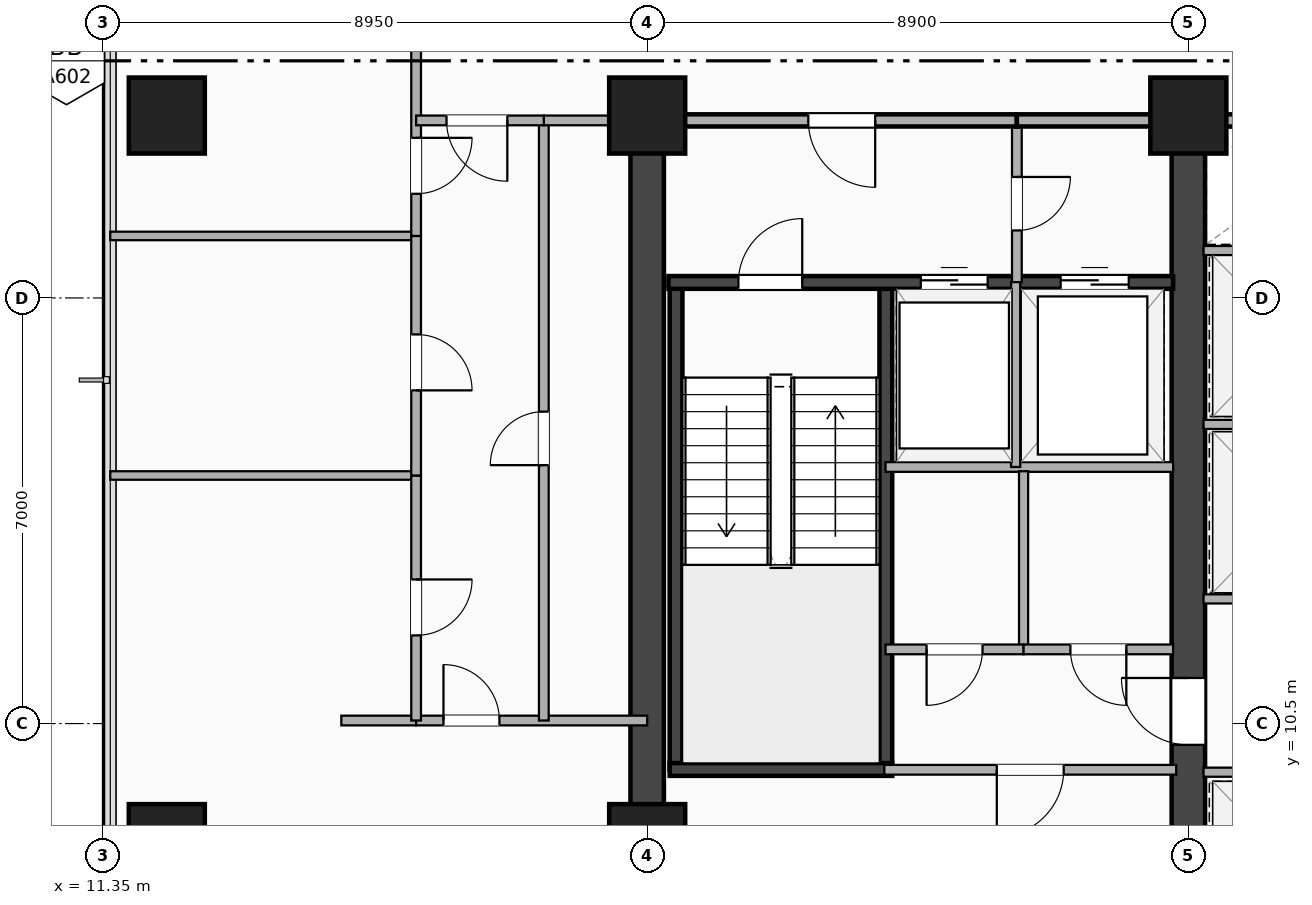
"""IFC4 building model, lengths in metres.
Left out: names, types, materials, properties, quantities, classifications, styles, units other than length and angle.
Written with IfcOpenShell. Run it as: python <this file> out.ifc"""

import sys

from ifc_helpers import new_model, si_unit, direction, frame, frame_2d, origin, origin_2d, place, context, subcontext, project, spatial, rectangle, extrude, element, fill, save


model = new_model("IFC4")
c1 = context("Model", 3, precision=1e-05, world=origin(), true_north=direction((0.0, 1.0)))
c2 = subcontext(c1, "Body", "Model", "MODEL_VIEW")
j1 = project(units=[si_unit("LENGTHUNIT", "METRE"), si_unit("PLANEANGLEUNIT", "RADIAN")], contexts=[c1])
p1 = place(None, origin())
s1 = spatial("IfcSite", under=j1, at=p1, CompositionType="ELEMENT")
p2 = place(p1, origin())
s2 = spatial("IfcBuilding", under=s1, at=p2, CompositionType="ELEMENT")
p3 = place(p2, frame((0.0, 0.0, 83.8)))
s3 = spatial("IfcBuildingStorey", under=s2, at=p3, CompositionType="ELEMENT", Elevation=83.8)
p4 = place(p3, frame((20.3, 3.5, 0.0), z_axis=(0.0, 0.0, 1.0), x_axis=(0.0, 1.0, 0.0)))
e1 = element("IfcWall", 1, at=p4, inside=s3, PredefinedType="SHEAR", context=c2, shape_type="SweptSolid", body=[
    extrude(rectangle(XDim=16.9, YDim=0.55, at=frame_2d((8.45, 0.0))), origin(), (0.0, 0.0, 1.0), 4.14),
])
p5 = place(p3, frame((29.2, 3.5, 0.0), z_axis=(0.0, 0.0, 1.0), x_axis=(0.0, 1.0, 0.0)))
e2 = element("IfcWall", 2, at=p5, inside=s3, PredefinedType="SHEAR", context=c2, shape_type="SweptSolid", body=[
    extrude(rectangle(XDim=16.9, YDim=0.55, at=frame_2d((8.45, 0.0))), origin(), (0.0, 0.0, 1.0), 4.14),
])
p6 = place(p5, frame((7.75, 0.0, 0.0), z_axis=(0.0, 0.0, 1.0), x_axis=(-1.0, 0.0, 0.0)))
e3 = element("IfcOpeningElement", 3, at=p6, cuts=e2, PredefinedType="OPENING", context=c2, shape_type="SweptSolid", body=[
    extrude(rectangle(XDim=1.1, YDim=2.15, at=frame_2d((0.55, 1.075))), frame((0.0, 0.285, 0.0), z_axis=(0.0, -1.0, 0.0), x_axis=(1.0, 0.0, 0.0)), (0.0, 0.0, 1.0), 0.57),
])
for number, where, z_axis, x_axis in (
    (4, (20.775, 9.745, 0.0), (0.0, 0.0, 1.0), (0.0, 1.0, 0.0)),
    (5, (24.225, 9.745, 0.0), (0.0, 0.0, 1.0), (0.0, 1.0, 0.0)),
):
    element("IfcWall", number, at=place(p3, frame(where, z_axis=z_axis, x_axis=x_axis)), inside=s3, PredefinedType="SHEAR", context=c2, shape_type="SweptSolid", body=[
        extrude(rectangle(XDim=8.01, YDim=0.21, at=frame_2d((4.005, 0.0))), origin(), (0.0, 0.0, 1.0), 4.14),
    ])
p7 = place(p3, frame((20.67, 9.745, 0.0), z_axis=(0.0, 0.0, 1.0), x_axis=(1.0, 0.0, 0.0)))
e6 = element("IfcWall", 6, at=p7, inside=s3, PredefinedType="SHEAR", context=c2, shape_type="SweptSolid", body=[
    extrude(rectangle(XDim=3.66, YDim=0.21, at=frame_2d((1.83, 0.0))), origin(), (0.0, 0.0, 1.0), 4.14),
])
p8 = place(p3, frame((20.65, 17.755, 0.0), z_axis=(0.0, 0.0, 1.0), x_axis=(1.0, 0.0, 0.0)))
e7 = element("IfcWall", 7, at=p8, inside=s3, PredefinedType="SHEAR", context=c2, shape_type="SweptSolid", body=[
    extrude(rectangle(XDim=8.3, YDim=0.21, at=frame_2d((4.15, 0.0))), origin(), (0.0, 0.0, 1.0), 4.14),
])
p9 = place(p8, frame((2.2, 0.0, 0.0), z_axis=(0.0, 0.0, 1.0), x_axis=(-1.0, 0.0, 0.0)))
e8 = element("IfcOpeningElement", 8, at=p9, cuts=e7, PredefinedType="OPENING", context=c2, shape_type="SweptSolid", body=[
    extrude(rectangle(XDim=1.05, YDim=2.15, at=frame_2d((0.525, 1.075))), frame((0.0, 0.115, 0.0), z_axis=(0.0, -1.0, 0.0), x_axis=(1.0, 0.0, 0.0)), (0.0, 0.0, 1.0), 0.23),
])
p10 = place(p8, frame((4.15, 0.0, 0.0)))
e9 = element("IfcOpeningElement", 9, at=p10, cuts=e7, PredefinedType="OPENING", context=c2, shape_type="SweptSolid", body=[
    extrude(rectangle(XDim=1.1, YDim=2.18, at=frame_2d((0.55, 1.09))), frame((0.0, 0.115, 0.0), z_axis=(0.0, -1.0, 0.0), x_axis=(1.0, 0.0, 0.0)), (0.0, 0.0, 1.0), 0.23),
])
p11 = place(p8, frame((6.45, 0.0, 0.0)))
e10 = element("IfcOpeningElement", 10, at=p11, cuts=e7, PredefinedType="OPENING", context=c2, shape_type="SweptSolid", body=[
    extrude(rectangle(XDim=1.12, YDim=2.2, at=frame_2d((0.56, 1.1))), frame((0.0, 0.115, 0.0), z_axis=(0.0, -1.0, 0.0), x_axis=(1.0, 0.0, 0.0)), (0.0, 0.0, 1.0), 0.23),
])
for number, where, z_axis, x_axis in (
    (11, (20.3, 8.55, -0.26), (0.0, 0.0, 1.0), (1.0, 0.0, 0.0)),
    (12, (20.3, 20.5, -0.26), (0.0, 0.0, 1.0), (1.0, 0.0, 0.0)),
    (13, (29.2, 20.5, -0.26), (0.0, 0.0, 1.0), (1.0, 0.0, 0.0)),
    (14, (12.4, 8.55, -0.26), (0.0, 0.0, 1.0), (1.0, 0.0, 0.0)),
    (15, (12.4, 20.5, -0.26), (0.0, 0.0, 1.0), (1.0, 0.0, 0.0)),
):
    element("IfcColumn", number, at=place(p3, frame(where, z_axis=z_axis, x_axis=x_axis)), inside=s3, PredefinedType="COLUMN", context=c2, shape_type="SweptSolid", body=[
        extrude(rectangle(XDim=1.25, YDim=1.25, at=origin_2d()), origin(), (0.0, 0.0, 1.0), 4.4),
    ])
p12 = place(p3, frame((26.38, 17.76, 0.0), z_axis=(0.0, 0.0, 1.0), x_axis=(0.0, 1.0, 0.0)))
e16 = element("IfcWall", 16, at=p12, inside=s3, PredefinedType="PARTITIONING", context=c2, shape_type="SweptSolid", body=[
    extrude(rectangle(XDim=2.66, YDim=0.16, at=frame_2d((1.33, 0.0))), origin(), (0.0, 0.0, 1.0), 3.514),
])
p13 = place(p12, frame((0.85, 0.0, 0.0)))
e17 = element("IfcOpeningElement", 17, at=p13, cuts=e16, PredefinedType="OPENING", context=c2, shape_type="SweptSolid", body=[
    extrude(rectangle(XDim=0.88, YDim=2.08, at=frame_2d((0.44, 1.04))), frame((0.0, 0.09, 0.0), z_axis=(0.0, -1.0, 0.0), x_axis=(1.0, 0.0, 0.0)), (0.0, 0.0, 1.0), 0.18),
])
p14 = place(p3, frame((24.22, 14.72, 0.0), z_axis=(0.0, 0.0, 1.0), x_axis=(1.0, 0.0, 0.0)))
e18 = element("IfcWall", 18, at=p14, inside=s3, PredefinedType="PARTITIONING", context=c2, shape_type="SweptSolid", body=[
    extrude(rectangle(XDim=4.73, YDim=0.16, at=frame_2d((2.365, 0.0))), origin(), (0.0, 0.0, 1.0), 4.14),
])
p15 = place(p3, frame((26.36, 14.72, 0.0), z_axis=(0.0, 0.0, 1.0), x_axis=(0.0, 1.0, 0.0)))
e19 = element("IfcWall", 19, at=p15, inside=s3, PredefinedType="PARTITIONING", context=c2, shape_type="SweptSolid", body=[
    extrude(rectangle(XDim=3.04, YDim=0.15, at=frame_2d((1.52, 0.0))), origin(), (0.0, 0.0, 1.0), 4.14),
])
p16 = place(p3, frame((20.65, 20.42, 0.0), z_axis=(0.0, 0.0, 1.0), x_axis=(1.0, 0.0, 0.0)))
e20 = element("IfcWall", 20, at=p16, inside=s3, PredefinedType="PARTITIONING", context=c2, shape_type="SweptSolid", body=[
    extrude(rectangle(XDim=5.73, YDim=0.2, at=frame_2d((2.865, 0.0))), origin(), (0.0, 0.0, 1.0), 3.213),
])
p17 = place(p16, frame((2.3, 0.0, 0.0)))
e21 = element("IfcOpeningElement", 21, at=p17, cuts=e20, PredefinedType="OPENING", context=c2, shape_type="SweptSolid", body=[
    extrude(rectangle(XDim=1.1, YDim=2.15, at=frame_2d((0.55, 1.075))), frame((0.0, 0.11, 0.0), z_axis=(0.0, -1.0, 0.0), x_axis=(1.0, 0.0, 0.0)), (0.0, 0.0, 1.0), 0.22),
])
p18 = place(p3, frame((26.38, 20.42, 0.0), z_axis=(0.0, 0.0, 1.0), x_axis=(1.0, 0.0, 0.0)))
e22 = element("IfcWall", 22, at=p18, inside=s3, PredefinedType="PARTITIONING", context=c2, shape_type="SweptSolid", body=[
    extrude(rectangle(XDim=2.82, YDim=0.2, at=frame_2d((1.41, 0.0))), origin(), (0.0, 0.0, 1.0), 3.213),
])
p19 = place(p3, frame((29.2, 20.42, 0.0), z_axis=(0.0, 0.0, 1.0), x_axis=(1.0, 0.0, 0.0)))
e23 = element("IfcWall", 23, at=p19, inside=s3, PredefinedType="PARTITIONING", context=c2, shape_type="SweptSolid", body=[
    extrude(rectangle(XDim=7.8, YDim=0.2, at=frame_2d((3.9, 0.0))), origin(), (0.0, 0.0, 1.0), 3.213),
])
p20 = place(p19, frame((3.55, 0.0, 0.0)))
e24 = element("IfcOpeningElement", 24, at=p20, cuts=e23, PredefinedType="OPENING", context=c2, shape_type="SweptSolid", body=[
    extrude(rectangle(XDim=1.1, YDim=2.15, at=frame_2d((0.55, 1.075))), frame((0.0, 0.11, 0.0), z_axis=(0.0, -1.0, 0.0), x_axis=(1.0, 0.0, 0.0)), (0.0, 0.0, 1.0), 0.22),
])
p21 = place(p3, frame((26.49, 11.72, 0.0), z_axis=(0.0, 0.0, 1.0), x_axis=(0.0, 1.0, 0.0)))
e25 = element("IfcWall", 25, at=p21, inside=s3, PredefinedType="PARTITIONING", context=c2, shape_type="SweptSolid", body=[
    extrude(rectangle(XDim=2.93, YDim=0.15, at=frame_2d((1.465, 0.0))), origin(), (0.0, 0.0, 1.0), 4.14),
])
p22 = place(p3, frame((24.22, 11.72, 0.0), z_axis=(0.0, 0.0, 1.0), x_axis=(1.0, 0.0, 0.0)))
e26 = element("IfcWall", 26, at=p22, inside=s3, PredefinedType="PARTITIONING", context=c2, shape_type="SweptSolid", body=[
    extrude(rectangle(XDim=2.271, YDim=0.16, at=frame_2d((1.135, 0.0))), origin(), (0.0, 0.0, 1.0), 4.14),
])
p23 = place(p22, frame((0.675, 0.0, 0.0)))
e27 = element("IfcOpeningElement", 27, at=p23, cuts=e26, PredefinedType="OPENING", context=c2, shape_type="SweptSolid", body=[
    extrude(rectangle(XDim=0.92, YDim=2.08, at=frame_2d((0.46, 1.04))), frame((0.0, 0.09, 0.0), z_axis=(0.0, -1.0, 0.0), x_axis=(1.0, 0.0, 0.0)), (0.0, 0.0, 1.0), 0.18),
])
p24 = place(p3, frame((26.49, 11.72, 0.0), z_axis=(0.0, 0.0, 1.0), x_axis=(1.0, 0.0, 0.0)))
e28 = element("IfcWall", 28, at=p24, inside=s3, PredefinedType="PARTITIONING", context=c2, shape_type="SweptSolid", body=[
    extrude(rectangle(XDim=2.459, YDim=0.16, at=frame_2d((1.23, 0.0))), origin(), (0.0, 0.0, 1.0), 4.14),
])
p25 = place(p24, frame((0.77, 0.0, 0.0)))
e29 = element("IfcOpeningElement", 29, at=p25, cuts=e28, PredefinedType="OPENING", context=c2, shape_type="SweptSolid", body=[
    extrude(rectangle(XDim=0.92, YDim=2.08, at=frame_2d((0.46, 1.04))), frame((0.0, 0.09, 0.0), z_axis=(0.0, -1.0, 0.0), x_axis=(1.0, 0.0, 0.0)), (0.0, 0.0, 1.0), 0.18),
])
p26 = place(p3, frame((24.2, 9.74, 0.0), z_axis=(0.0, 0.0, 1.0), x_axis=(1.0, 0.0, 0.0)))
e30 = element("IfcWall", 30, at=p26, inside=s3, PredefinedType="PARTITIONING", context=c2, shape_type="SweptSolid", body=[
    extrude(rectangle(XDim=4.8, YDim=0.16, at=frame_2d((2.4, 0.0))), origin(), (0.0, 0.0, 1.0), 4.14),
])
p27 = place(p26, frame((1.85, 0.0, 0.0)))
e31 = element("IfcOpeningElement", 31, at=p27, cuts=e30, PredefinedType="OPENING", context=c2, shape_type="SweptSolid", body=[
    extrude(rectangle(XDim=1.1, YDim=2.15, at=frame_2d((0.55, 1.075))), frame((0.0, 0.09, 0.0), z_axis=(0.0, -1.0, 0.0), x_axis=(1.0, 0.0, 0.0)), (0.0, 0.0, 1.0), 0.18),
])
for number, where, z_axis, x_axis in (
    (32, (29.45, 9.7, 0.0), (0.0, 0.0, 1.0), (1.0, 0.0, 0.0)),
    (33, (29.45, 12.55, 0.0), (0.0, 0.0, 1.0), (1.0, 0.0, 0.0)),
    (34, (29.45, 15.42, 0.0), (0.0, 0.0, 1.0), (1.0, 0.0, 0.0)),
    (35, (29.45, 18.28, 0.0), (0.0, 0.0, 1.0), (1.0, 0.0, 0.0)),
):
    element("IfcWall", number, at=place(p3, frame(where, z_axis=z_axis, x_axis=x_axis)), inside=s3, PredefinedType="PARTITIONING", context=c2, shape_type="SweptSolid", body=[
        extrude(rectangle(XDim=2.77, YDim=0.15, at=frame_2d((1.385, 0.0))), origin(), (0.0, 0.0, 1.0), 4.14),
    ])
p28 = place(p3, frame((15.27, 10.55, 0.0), z_axis=(0.0, 0.0, 1.0), x_axis=(1.0, 0.0, 0.0)))
e36 = element("IfcWall", 36, at=p28, inside=s3, PredefinedType="PARTITIONING", context=c2, shape_type="SweptSolid", body=[
    extrude(rectangle(XDim=1.23, YDim=0.16, at=frame_2d((0.615, 0.0))), origin(), (0.0, 0.0, 1.0), 4.14),
])
p29 = place(p3, frame((16.5, 10.55, 0.0), z_axis=(0.0, 0.0, 1.0), x_axis=(1.0, 0.0, 0.0)))
e37 = element("IfcWall", 37, at=p29, inside=s3, PredefinedType="PARTITIONING", context=c2, shape_type="SweptSolid", body=[
    extrude(rectangle(XDim=3.8, YDim=0.16, at=frame_2d((1.9, 0.0))), origin(), (0.0, 0.0, 1.0), 3.213),
])
p30 = place(p29, frame((1.37, 0.0, 0.0), z_axis=(0.0, 0.0, 1.0), x_axis=(-1.0, 0.0, 0.0)))
e38 = element("IfcOpeningElement", 38, at=p30, cuts=e37, PredefinedType="OPENING", context=c2, shape_type="SweptSolid", body=[
    extrude(rectangle(XDim=0.92, YDim=2.08, at=frame_2d((0.46, 1.04))), frame((0.0, 0.09, 0.0), z_axis=(0.0, -1.0, 0.0), x_axis=(1.0, 0.0, 0.0)), (0.0, 0.0, 1.0), 0.18),
])
for number, where, z_axis, x_axis in (
    (39, (11.47, 14.58, 0.0), (0.0, 0.0, 1.0), (1.0, 0.0, 0.0)),
    (40, (11.47, 18.52, 0.0), (0.0, 0.0, 1.0), (1.0, 0.0, 0.0)),
):
    element("IfcWall", number, at=place(p3, frame(where, z_axis=z_axis, x_axis=x_axis)), inside=s3, PredefinedType="PARTITIONING", context=c2, shape_type="SweptSolid", body=[
        extrude(rectangle(XDim=5.03, YDim=0.14, at=frame_2d((2.515, 0.0))), origin(), (0.0, 0.0, 1.0), 3.503),
    ])
p31 = place(p3, frame((16.5, 10.55, 0.0), z_axis=(0.0, 0.0, 1.0), x_axis=(0.0, 1.0, 0.0)))
e41 = element("IfcWall", 41, at=p31, inside=s3, PredefinedType="PARTITIONING", context=c2, shape_type="SweptSolid", body=[
    extrude(rectangle(XDim=4.03, YDim=0.16, at=frame_2d((2.015, 0.0))), origin(), (0.0, 0.0, 1.0), 3.822),
])
p32 = place(p31, frame((1.4, 0.0, 0.0)))
e42 = element("IfcOpeningElement", 42, at=p32, cuts=e41, PredefinedType="OPENING", context=c2, shape_type="SweptSolid", body=[
    extrude(rectangle(XDim=0.92, YDim=2.08, at=frame_2d((0.46, 1.04))), frame((0.0, 0.09, 0.0), z_axis=(0.0, -1.0, 0.0), x_axis=(1.0, 0.0, 0.0)), (0.0, 0.0, 1.0), 0.18),
])
p33 = place(p3, frame((16.5, 14.58, 0.0), z_axis=(0.0, 0.0, 1.0), x_axis=(0.0, 1.0, 0.0)))
e43 = element("IfcWall", 43, at=p33, inside=s3, PredefinedType="PARTITIONING", context=c2, shape_type="SweptSolid", body=[
    extrude(rectangle(XDim=3.94, YDim=0.16, at=frame_2d((1.97, 0.0))), origin(), (0.0, 0.0, 1.0), 3.822),
])
p34 = place(p33, frame((1.4, 0.0, 0.0)))
e44 = element("IfcOpeningElement", 44, at=p34, cuts=e43, PredefinedType="OPENING", context=c2, shape_type="SweptSolid", body=[
    extrude(rectangle(XDim=0.92, YDim=2.08, at=frame_2d((0.46, 1.04))), frame((0.0, 0.09, 0.0), z_axis=(0.0, -1.0, 0.0), x_axis=(1.0, 0.0, 0.0)), (0.0, 0.0, 1.0), 0.18),
])
p35 = place(p3, frame((16.5, 18.52, 0.0), z_axis=(0.0, 0.0, 1.0), x_axis=(0.0, 1.0, 0.0)))
e45 = element("IfcWall", 45, at=p35, inside=s3, PredefinedType="PARTITIONING", context=c2, shape_type="SweptSolid", body=[
    extrude(rectangle(XDim=4.2, YDim=0.16, at=frame_2d((2.1, 0.0))), origin(), (0.0, 0.0, 1.0), 3.213),
])
p36 = place(p35, frame((0.693, 0.0, 0.0)))
e46 = element("IfcOpeningElement", 46, at=p36, cuts=e45, PredefinedType="OPENING", context=c2, shape_type="SweptSolid", body=[
    extrude(rectangle(XDim=0.92, YDim=2.08, at=frame_2d((0.46, 1.04))), frame((0.0, 0.09, 0.0), z_axis=(0.0, -1.0, 0.0), x_axis=(1.0, 0.0, 0.0)), (0.0, 0.0, 1.0), 0.18),
])
p37 = place(p3, frame((18.6, 10.55, 0.0), z_axis=(0.0, 0.0, 1.0), x_axis=(0.0, 1.0, 0.0)))
e47 = element("IfcWall", 47, at=p37, inside=s3, PredefinedType="PARTITIONING", context=c2, shape_type="SweptSolid", body=[
    extrude(rectangle(XDim=9.87, YDim=0.16, at=frame_2d((4.935, 0.0))), origin(), (0.0, 0.0, 1.0), 3.213),
])
p38 = place(p37, frame((5.08, 0.0, 0.0), z_axis=(0.0, 0.0, 1.0), x_axis=(-1.0, 0.0, 0.0)))
e48 = element("IfcOpeningElement", 48, at=p38, cuts=e47, PredefinedType="OPENING", context=c2, shape_type="SweptSolid", body=[
    extrude(rectangle(XDim=0.88, YDim=2.08, at=frame_2d((0.44, 1.04))), frame((0.0, 0.09, 0.0), z_axis=(0.0, -1.0, 0.0), x_axis=(1.0, 0.0, 0.0)), (0.0, 0.0, 1.0), 0.18),
])
p39 = place(p3, frame((18.6, 20.42, 0.0), z_axis=(0.0, 0.0, 1.0), x_axis=(1.0, 0.0, 0.0)))
e49 = element("IfcWall", 49, at=p39, inside=s3, PredefinedType="PARTITIONING", context=c2, shape_type="SweptSolid", body=[
    extrude(rectangle(XDim=1.7, YDim=0.16, at=frame_2d((0.85, 0.0))), origin(), (0.0, 0.0, 1.0), 3.213),
])
p40 = place(p3, frame((16.5, 20.42, 0.0), z_axis=(0.0, 0.0, 1.0), x_axis=(1.0, 0.0, 0.0)))
e50 = element("IfcWall", 50, at=p40, inside=s3, PredefinedType="PARTITIONING", context=c2, shape_type="SweptSolid", body=[
    extrude(rectangle(XDim=2.1, YDim=0.16, at=frame_2d((1.05, 0.0))), origin(), (0.0, 0.0, 1.0), 3.213),
])
p41 = place(p40, frame((0.5, 0.0, 0.0)))
e51 = element("IfcOpeningElement", 51, at=p41, cuts=e50, PredefinedType="OPENING", context=c2, shape_type="SweptSolid", body=[
    extrude(rectangle(XDim=1.0, YDim=2.15, at=frame_2d((0.5, 1.075))), frame((0.0, 0.09, 0.0), z_axis=(0.0, -1.0, 0.0), x_axis=(1.0, 0.0, 0.0)), (0.0, 0.0, 1.0), 0.18),
])
p42 = place(p9, origin())
e52 = element("IfcDoor", 52, at=p42, inside=s3, OperationType="SINGLE_SWING_RIGHT", PredefinedType="DOOR", context=c2, shape_type="SweptSolid", body=[
    extrude(rectangle(XDim=1.05, YDim=2.15, at=frame_2d((0.525, 1.075))), frame((0.0, 0.025, 0.0), z_axis=(0.0, -1.0, 0.0), x_axis=(1.0, 0.0, 0.0)), (0.0, 0.0, 1.0), 0.05),
])
fill(e8, e52)
p43 = place(p10, origin())
e53 = element("IfcDoor", 53, at=p43, inside=s3, OperationType="DOUBLE_DOOR_SLIDING", PredefinedType="DOOR", context=c2, shape_type="SweptSolid", body=[
    extrude(rectangle(XDim=1.1, YDim=2.18, at=frame_2d((0.55, 1.09))), frame((0.0, 0.025, 0.0), z_axis=(0.0, -1.0, 0.0), x_axis=(1.0, 0.0, 0.0)), (0.0, 0.0, 1.0), 0.05),
])
fill(e9, e53)
p44 = place(p11, origin())
e54 = element("IfcDoor", 54, at=p44, inside=s3, OperationType="DOUBLE_DOOR_SLIDING", PredefinedType="DOOR", context=c2, shape_type="SweptSolid", body=[
    extrude(rectangle(XDim=1.12, YDim=2.2, at=frame_2d((0.56, 1.1))), frame((0.0, 0.025, 0.0), z_axis=(0.0, -1.0, 0.0), x_axis=(1.0, 0.0, 0.0)), (0.0, 0.0, 1.0), 0.05),
])
fill(e10, e54)
p45 = place(p6, origin())
e55 = element("IfcDoor", 55, at=p45, inside=s3, OperationType="SINGLE_SWING_RIGHT", PredefinedType="DOOR", context=c2, shape_type="SweptSolid", body=[
    extrude(rectangle(XDim=1.1, YDim=2.15, at=frame_2d((0.55, 1.075))), frame((0.0, 0.025, 0.0), z_axis=(0.0, -1.0, 0.0), x_axis=(1.0, 0.0, 0.0)), (0.0, 0.0, 1.0), 0.05),
])
fill(e3, e55)
p46 = place(p13, origin())
e56 = element("IfcDoor", 56, at=p46, inside=s3, OperationType="SINGLE_SWING_RIGHT", PredefinedType="DOOR", context=c2, shape_type="SweptSolid", body=[
    extrude(rectangle(XDim=0.88, YDim=2.08, at=frame_2d((0.44, 1.04))), frame((0.0, 0.025, 0.0), z_axis=(0.0, -1.0, 0.0), x_axis=(1.0, 0.0, 0.0)), (0.0, 0.0, 1.0), 0.05),
])
fill(e17, e56)
p47 = place(p17, origin())
e57 = element("IfcDoor", 57, at=p47, inside=s3, OperationType="SINGLE_SWING_RIGHT", PredefinedType="DOOR", context=c2, shape_type="SweptSolid", body=[
    extrude(rectangle(XDim=1.1, YDim=2.15, at=frame_2d((0.55, 1.075))), frame((0.0, 0.025, 0.0), z_axis=(0.0, -1.0, 0.0), x_axis=(1.0, 0.0, 0.0)), (0.0, 0.0, 1.0), 0.05),
])
fill(e21, e57)
p48 = place(p23, origin())
e58 = element("IfcDoor", 58, at=p48, inside=s3, OperationType="SINGLE_SWING_LEFT", PredefinedType="DOOR", context=c2, shape_type="SweptSolid", body=[
    extrude(rectangle(XDim=0.92, YDim=2.08, at=frame_2d((0.46, 1.04))), frame((0.0, 0.025, 0.0), z_axis=(0.0, -1.0, 0.0), x_axis=(1.0, 0.0, 0.0)), (0.0, 0.0, 1.0), 0.05),
])
fill(e27, e58)
p49 = place(p25, origin())
e59 = element("IfcDoor", 59, at=p49, inside=s3, OperationType="SINGLE_SWING_RIGHT", PredefinedType="DOOR", context=c2, shape_type="SweptSolid", body=[
    extrude(rectangle(XDim=0.92, YDim=2.08, at=frame_2d((0.46, 1.04))), frame((0.0, 0.025, 0.0), z_axis=(0.0, -1.0, 0.0), x_axis=(1.0, 0.0, 0.0)), (0.0, 0.0, 1.0), 0.05),
])
fill(e29, e59)
p50 = place(p27, origin())
e60 = element("IfcDoor", 60, at=p50, inside=s3, OperationType="SINGLE_SWING_LEFT", PredefinedType="DOOR", context=c2, shape_type="SweptSolid", body=[
    extrude(rectangle(XDim=1.1, YDim=2.15, at=frame_2d((0.55, 1.075))), frame((0.0, 0.025, 0.0), z_axis=(0.0, -1.0, 0.0), x_axis=(1.0, 0.0, 0.0)), (0.0, 0.0, 1.0), 0.05),
])
fill(e31, e60)
p51 = place(p30, origin())
e61 = element("IfcDoor", 61, at=p51, inside=s3, OperationType="SINGLE_SWING_LEFT", PredefinedType="DOOR", context=c2, shape_type="SweptSolid", body=[
    extrude(rectangle(XDim=0.92, YDim=2.08, at=frame_2d((0.46, 1.04))), frame((0.0, 0.025, 0.0), z_axis=(0.0, -1.0, 0.0), x_axis=(1.0, 0.0, 0.0)), (0.0, 0.0, 1.0), 0.05),
])
fill(e38, e61)
p52 = place(p32, origin())
e62 = element("IfcDoor", 62, at=p52, inside=s3, OperationType="SINGLE_SWING_RIGHT", PredefinedType="DOOR", context=c2, shape_type="SweptSolid", body=[
    extrude(rectangle(XDim=0.92, YDim=2.08, at=frame_2d((0.46, 1.04))), frame((0.0, 0.025, 0.0), z_axis=(0.0, -1.0, 0.0), x_axis=(1.0, 0.0, 0.0)), (0.0, 0.0, 1.0), 0.05),
])
fill(e42, e62)
p53 = place(p34, origin())
e63 = element("IfcDoor", 63, at=p53, inside=s3, OperationType="SINGLE_SWING_LEFT", PredefinedType="DOOR", context=c2, shape_type="SweptSolid", body=[
    extrude(rectangle(XDim=0.92, YDim=2.08, at=frame_2d((0.46, 1.04))), frame((0.0, 0.025, 0.0), z_axis=(0.0, -1.0, 0.0), x_axis=(1.0, 0.0, 0.0)), (0.0, 0.0, 1.0), 0.05),
])
fill(e44, e63)
p54 = place(p36, origin())
e64 = element("IfcDoor", 64, at=p54, inside=s3, OperationType="SINGLE_SWING_RIGHT", PredefinedType="DOOR", context=c2, shape_type="SweptSolid", body=[
    extrude(rectangle(XDim=0.92, YDim=2.08, at=frame_2d((0.46, 1.04))), frame((0.0, 0.025, 0.0), z_axis=(0.0, -1.0, 0.0), x_axis=(1.0, 0.0, 0.0)), (0.0, 0.0, 1.0), 0.05),
])
fill(e46, e64)
p55 = place(p38, origin())
e65 = element("IfcDoor", 65, at=p55, inside=s3, OperationType="SINGLE_SWING_LEFT", PredefinedType="DOOR", context=c2, shape_type="SweptSolid", body=[
    extrude(rectangle(XDim=0.88, YDim=2.08, at=frame_2d((0.44, 1.04))), frame((0.0, 0.025, 0.0), z_axis=(0.0, -1.0, 0.0), x_axis=(1.0, 0.0, 0.0)), (0.0, 0.0, 1.0), 0.05),
])
fill(e48, e65)
p56 = place(p41, origin())
e66 = element("IfcDoor", 66, at=p56, inside=s3, OperationType="SINGLE_SWING_RIGHT", PredefinedType="DOOR", context=c2, shape_type="SweptSolid", body=[
    extrude(rectangle(XDim=1.0, YDim=2.15, at=frame_2d((0.5, 1.075))), frame((0.0, 0.025, 0.0), z_axis=(0.0, -1.0, 0.0), x_axis=(1.0, 0.0, 0.0)), (0.0, 0.0, 1.0), 0.05),
])
fill(e51, e66)
save(model, sys.argv[1])
